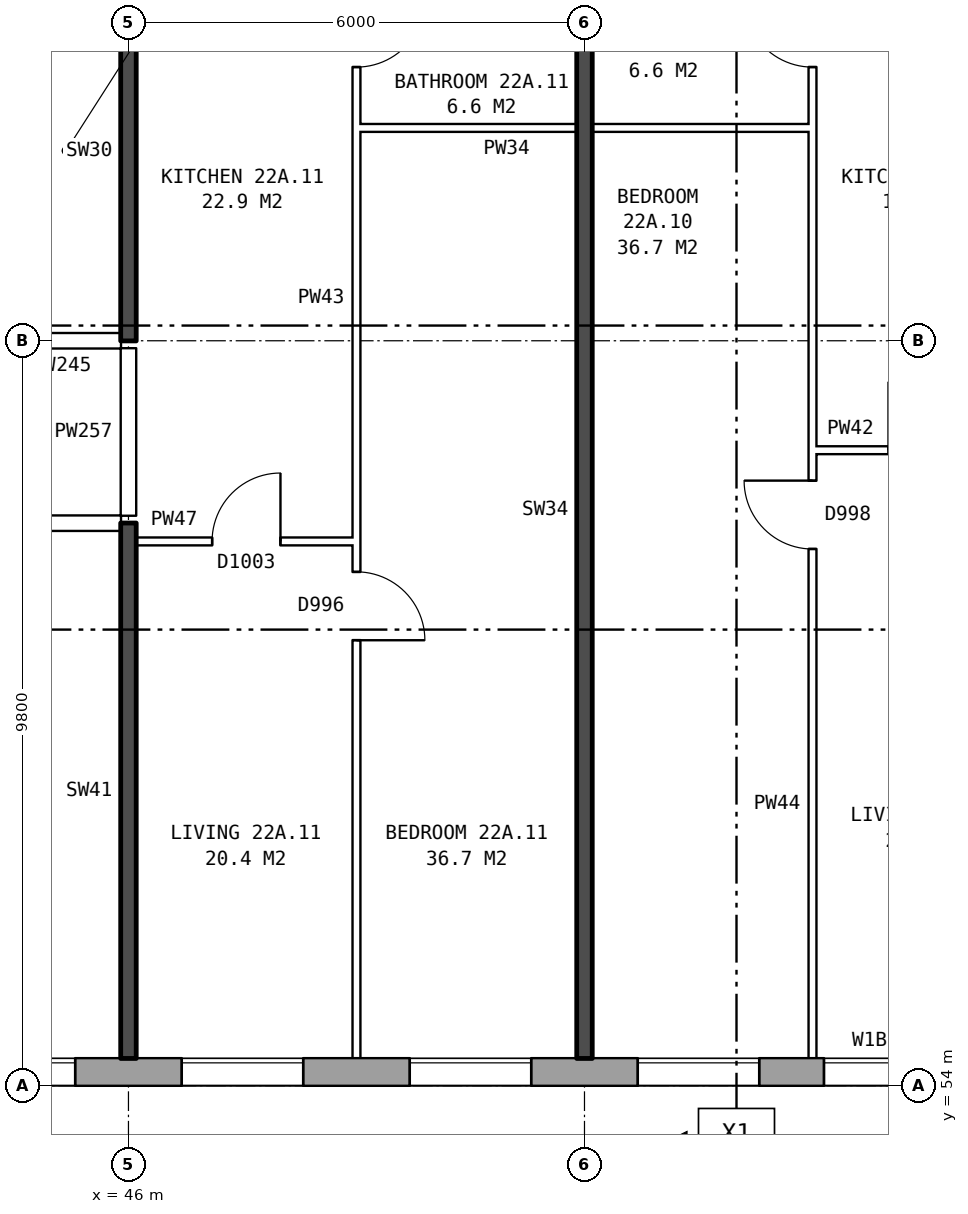
"""IFC4 building model, lengths in metres.
Left out: names, types, materials, properties, quantities, classifications, styles, units other than length and angle.
Written with IfcOpenShell. Run it as: python <this file> out.ifc"""

import sys

from ifc_helpers import new_model, si_unit, direction, frame, frame_2d, origin, place, context, subcontext, project, spatial, rectangle, extrude, element, fill, save


model = new_model("IFC4")
c1 = context("Model", 3, precision=1e-05, world=origin(), true_north=direction((0.0, 1.0)))
c2 = subcontext(c1, "Body", "Model", "MODEL_VIEW")
j1 = project(units=[si_unit("LENGTHUNIT", "METRE"), si_unit("PLANEANGLEUNIT", "RADIAN")], contexts=[c1])
p1 = place(None, origin())
s1 = spatial("IfcSite", under=j1, at=p1, CompositionType="ELEMENT")
p2 = place(p1, origin())
s2 = spatial("IfcBuilding", under=s1, at=p2, CompositionType="ELEMENT")
p3 = place(p2, frame((0.0, 0.0, 80.9)))
s3 = spatial("IfcBuildingStorey", under=s2, at=p3, CompositionType="ELEMENT", Elevation=80.9)
p4 = place(p3, frame((26.325, 54.18, 0.0), z_axis=(0.0, 0.0, 1.0), x_axis=(1.0, 0.0, 0.0)))
e1 = element("IfcWall", 1, at=p4, inside=s3, PredefinedType="STANDARD", context=c2, shape_type="SweptSolid", body=[
    extrude(rectangle(XDim=46.601, YDim=0.36, at=frame_2d((23.3, 0.0))), origin(), (0.0, 0.0, 1.0), 2.85),
])
p5 = place(p4, frame((2.375, 0.0, 0.8)))
e2 = element("IfcOpeningElement", 2, at=p5, cuts=e1, PredefinedType="OPENING", context=c2, shape_type="SweptSolid", body=[
    extrude(rectangle(XDim=1.6, YDim=1.8, at=frame_2d((0.8, 0.9))), frame((0.0, 0.19, 0.0), z_axis=(0.0, -1.0, 0.0), x_axis=(1.0, 0.0, 0.0)), (0.0, 0.0, 1.0), 0.38),
])
p6 = place(p4, frame((5.375, 0.0, 0.8)))
e3 = element("IfcOpeningElement", 3, at=p6, cuts=e1, PredefinedType="OPENING", context=c2, shape_type="SweptSolid", body=[
    extrude(rectangle(XDim=1.6, YDim=1.8, at=frame_2d((0.8, 0.9))), frame((0.0, 0.19, 0.0), z_axis=(0.0, -1.0, 0.0), x_axis=(1.0, 0.0, 0.0)), (0.0, 0.0, 1.0), 0.38),
])
p7 = place(p4, frame((8.375, 0.0, 0.8)))
e4 = element("IfcOpeningElement", 4, at=p7, cuts=e1, PredefinedType="OPENING", context=c2, shape_type="SweptSolid", body=[
    extrude(rectangle(XDim=1.6, YDim=1.8, at=frame_2d((0.8, 0.9))), frame((0.0, 0.19, 0.0), z_axis=(0.0, -1.0, 0.0), x_axis=(1.0, 0.0, 0.0)), (0.0, 0.0, 1.0), 0.38),
])
p8 = place(p4, frame((11.375, 0.0, 0.8)))
e5 = element("IfcOpeningElement", 5, at=p8, cuts=e1, PredefinedType="OPENING", context=c2, shape_type="SweptSolid", body=[
    extrude(rectangle(XDim=1.6, YDim=1.8, at=frame_2d((0.8, 0.9))), frame((0.0, 0.19, 0.0), z_axis=(0.0, -1.0, 0.0), x_axis=(1.0, 0.0, 0.0)), (0.0, 0.0, 1.0), 0.38),
])
p9 = place(p4, frame((15.875, 0.0, 0.8)))
e6 = element("IfcOpeningElement", 6, at=p9, cuts=e1, PredefinedType="OPENING", context=c2, shape_type="SweptSolid", body=[
    extrude(rectangle(XDim=1.2, YDim=1.2, at=frame_2d((0.6, 0.6))), frame((0.0, 0.19, 0.0), z_axis=(0.0, -1.0, 0.0), x_axis=(1.0, 0.0, 0.0)), (0.0, 0.0, 1.0), 0.38),
])
p10 = place(p4, frame((17.375, 0.0, 0.8)))
e7 = element("IfcOpeningElement", 7, at=p10, cuts=e1, PredefinedType="OPENING", context=c2, shape_type="SweptSolid", body=[
    extrude(rectangle(XDim=1.6, YDim=1.8, at=frame_2d((0.8, 0.9))), frame((0.0, 0.19, 0.0), z_axis=(0.0, -1.0, 0.0), x_axis=(1.0, 0.0, 0.0)), (0.0, 0.0, 1.0), 0.38),
])
p11 = place(p4, frame((20.375, 0.0, 0.8)))
e8 = element("IfcOpeningElement", 8, at=p11, cuts=e1, PredefinedType="OPENING", context=c2, shape_type="SweptSolid", body=[
    extrude(rectangle(XDim=1.6, YDim=1.8, at=frame_2d((0.8, 0.9))), frame((0.0, 0.19, 0.0), z_axis=(0.0, -1.0, 0.0), x_axis=(1.0, 0.0, 0.0)), (0.0, 0.0, 1.0), 0.38),
])
p12 = place(p4, frame((23.375, 0.0, 0.8)))
e9 = element("IfcOpeningElement", 9, at=p12, cuts=e1, PredefinedType="OPENING", context=c2, shape_type="SweptSolid", body=[
    extrude(rectangle(XDim=1.6, YDim=1.8, at=frame_2d((0.8, 0.9))), frame((0.0, 0.19, 0.0), z_axis=(0.0, -1.0, 0.0), x_axis=(1.0, 0.0, 0.0)), (0.0, 0.0, 1.0), 0.38),
])
p13 = place(p4, frame((26.375, 0.0, 0.8)))
e10 = element("IfcOpeningElement", 10, at=p13, cuts=e1, PredefinedType="OPENING", context=c2, shape_type="SweptSolid", body=[
    extrude(rectangle(XDim=1.6, YDim=1.8, at=frame_2d((0.8, 0.9))), frame((0.0, 0.19, 0.0), z_axis=(0.0, -1.0, 0.0), x_axis=(1.0, 0.0, 0.0)), (0.0, 0.0, 1.0), 0.38),
])
p14 = place(p4, frame((28.825, 0.0, 0.8)))
e11 = element("IfcOpeningElement", 11, at=p14, cuts=e1, PredefinedType="OPENING", context=c2, shape_type="SweptSolid", body=[
    extrude(rectangle(XDim=1.2, YDim=1.8, at=frame_2d((0.6, 0.9))), frame((0.0, 0.19, 0.0), z_axis=(0.0, -1.0, 0.0), x_axis=(1.0, 0.0, 0.0)), (0.0, 0.0, 1.0), 0.38),
])
p15 = place(p4, frame((32.375, 0.0, 1.7)))
e12 = element("IfcOpeningElement", 12, at=p15, cuts=e1, PredefinedType="OPENING", context=c2, shape_type="SweptSolid", body=[
    extrude(rectangle(XDim=0.8, YDim=0.9, at=frame_2d((0.4, 0.45))), frame((0.0, 0.19, 0.0), z_axis=(0.0, -1.0, 0.0), x_axis=(1.0, 0.0, 0.0)), (0.0, 0.0, 1.0), 0.38),
])
p16 = place(p4, frame((35.375, 0.0, 0.8)))
e13 = element("IfcOpeningElement", 13, at=p16, cuts=e1, PredefinedType="OPENING", context=c2, shape_type="SweptSolid", body=[
    extrude(rectangle(XDim=1.6, YDim=1.8, at=frame_2d((0.8, 0.9))), frame((0.0, 0.19, 0.0), z_axis=(0.0, -1.0, 0.0), x_axis=(1.0, 0.0, 0.0)), (0.0, 0.0, 1.0), 0.38),
])
p17 = place(p4, frame((38.375, 0.0, 0.8)))
e14 = element("IfcOpeningElement", 14, at=p17, cuts=e1, PredefinedType="OPENING", context=c2, shape_type="SweptSolid", body=[
    extrude(rectangle(XDim=1.6, YDim=1.8, at=frame_2d((0.8, 0.9))), frame((0.0, 0.19, 0.0), z_axis=(0.0, -1.0, 0.0), x_axis=(1.0, 0.0, 0.0)), (0.0, 0.0, 1.0), 0.38),
])
p18 = place(p4, frame((41.375, 0.0, 0.8)))
e15 = element("IfcOpeningElement", 15, at=p18, cuts=e1, PredefinedType="OPENING", context=c2, shape_type="SweptSolid", body=[
    extrude(rectangle(XDim=1.6, YDim=1.8, at=frame_2d((0.8, 0.9))), frame((0.0, 0.19, 0.0), z_axis=(0.0, -1.0, 0.0), x_axis=(1.0, 0.0, 0.0)), (0.0, 0.0, 1.0), 0.38),
])
p19 = place(p4, frame((44.375, 0.0, 0.8)))
e16 = element("IfcOpeningElement", 16, at=p19, cuts=e1, PredefinedType="OPENING", context=c2, shape_type="SweptSolid", body=[
    extrude(rectangle(XDim=1.6, YDim=1.8, at=frame_2d((0.8, 0.9))), frame((0.0, 0.19, 0.0), z_axis=(0.0, -1.0, 0.0), x_axis=(1.0, 0.0, 0.0)), (0.0, 0.0, 1.0), 0.38),
])
p20 = place(p4, frame((30.325, 0.0, 0.8)))
e17 = element("IfcOpeningElement", 17, at=p20, cuts=e1, PredefinedType="OPENING", context=c2, shape_type="SweptSolid", body=[
    extrude(rectangle(XDim=0.6, YDim=0.9, at=frame_2d((0.3, 0.45))), frame((0.0, 0.19, 0.0), z_axis=(0.0, -1.0, 0.0), x_axis=(1.0, 0.0, 0.0)), (0.0, 0.0, 1.0), 0.38),
])
p21 = place(p4, frame((33.475, 0.0, 0.8)))
e18 = element("IfcOpeningElement", 18, at=p21, cuts=e1, PredefinedType="OPENING", context=c2, shape_type="SweptSolid", body=[
    extrude(rectangle(XDim=1.0, YDim=1.8, at=frame_2d((0.5, 0.9))), frame((0.0, 0.19, 0.0), z_axis=(0.0, -1.0, 0.0), x_axis=(1.0, 0.0, 0.0)), (0.0, 0.0, 1.0), 0.38),
])
p22 = place(p3, frame((46.1, 61.16, 0.0), z_axis=(0.0, 0.0, 1.0), x_axis=(1.0, 0.0, 0.0)))
e19 = element("IfcWall", 19, at=p22, inside=s3, PredefinedType="PARTITIONING", context=c2, shape_type="SweptSolid", body=[
    extrude(rectangle(XDim=2.9, YDim=0.1, at=frame_2d((1.45, 0.0))), origin(), (0.0, 0.0, 1.0), 2.85),
])
p23 = place(p22, frame((1.0, 0.0, 0.0)))
e20 = element("IfcOpeningElement", 20, at=p23, cuts=e19, PredefinedType="OPENING", context=c2, shape_type="SweptSolid", body=[
    extrude(rectangle(XDim=0.9, YDim=2.1, at=frame_2d((0.45, 1.05))), frame((0.0, 0.06, 0.0), z_axis=(0.0, -1.0, 0.0), x_axis=(1.0, 0.0, 0.0)), (0.0, 0.0, 1.0), 0.12),
])
p24 = place(p3, frame((23.61, 61.4, 0.0), z_axis=(0.0, 0.0, 1.0), x_axis=(1.0, 0.0, 0.0)))
e21 = element("IfcWall", 21, at=p24, inside=s3, PredefinedType="PARTITIONING", context=c2, shape_type="SweptSolid", body=[
    extrude(rectangle(XDim=22.29, YDim=0.2, at=frame_2d((11.145, 0.0))), origin(), (0.0, 0.0, 1.0), 2.85),
])
p25 = place(p24, frame((18.84, 0.0, 0.0)))
e22 = element("IfcOpeningElement", 22, at=p25, cuts=e21, PredefinedType="OPENING", context=c2, shape_type="SweptSolid", body=[
    extrude(rectangle(XDim=1.0, YDim=2.1, at=frame_2d((0.5, 1.05))), frame((0.0, 0.11, 0.0), z_axis=(0.0, -1.0, 0.0), x_axis=(1.0, 0.0, 0.0)), (0.0, 0.0, 1.0), 0.22),
])
p26 = place(p24, frame((6.89, 0.0, 0.0)))
e23 = element("IfcOpeningElement", 23, at=p26, cuts=e21, PredefinedType="OPENING", context=c2, shape_type="SweptSolid", body=[
    extrude(rectangle(XDim=1.0, YDim=2.1, at=frame_2d((0.5, 1.05))), frame((0.0, 0.11, 0.0), z_axis=(0.0, -1.0, 0.0), x_axis=(1.0, 0.0, 0.0)), (0.0, 0.0, 1.0), 0.22),
])
p27 = place(p3, frame((55.0, 62.36, 0.0), z_axis=(0.0, 0.0, 1.0), x_axis=(1.0, 0.0, 0.0)))
e24 = element("IfcWall", 24, at=p27, inside=s3, PredefinedType="PARTITIONING", context=c2, shape_type="SweptSolid", body=[
    extrude(rectangle(XDim=2.9, YDim=0.1, at=frame_2d((1.45, 0.0))), origin(), (0.0, 0.0, 1.0), 2.85),
])
p28 = place(p27, frame((1.0, 0.0, 0.0)))
e25 = element("IfcOpeningElement", 25, at=p28, cuts=e24, PredefinedType="OPENING", context=c2, shape_type="SweptSolid", body=[
    extrude(rectangle(XDim=0.9, YDim=2.1, at=frame_2d((0.45, 1.05))), frame((0.0, 0.06, 0.0), z_axis=(0.0, -1.0, 0.0), x_axis=(1.0, 0.0, 0.0)), (0.0, 0.0, 1.0), 0.12),
])
p29 = place(p3, frame((44.36, 63.8, 0.0), z_axis=(0.0, 0.0, 1.0), x_axis=(1.0, 0.0, 0.0)))
e26 = element("IfcWall", 26, at=p29, inside=s3, PredefinedType="PARTITIONING", context=c2, shape_type="SweptSolid", body=[
    extrude(rectangle(XDim=1.54, YDim=0.2, at=frame_2d((0.77, 0.0))), origin(), (0.0, 0.0, 1.0), 2.85),
])
p30 = place(p3, frame((49.0, 66.6, 0.0), z_axis=(0.0, 0.0, 1.0), x_axis=(1.0, 0.0, 0.0)))
e27 = element("IfcWall", 27, at=p30, inside=s3, PredefinedType="PARTITIONING", context=c2, shape_type="SweptSolid", body=[
    extrude(rectangle(XDim=6.0, YDim=0.1, at=frame_2d((3.0, 0.0))), origin(), (0.0, 0.0, 1.0), 2.85),
])
p31 = place(p3, frame((46.0, 54.36, 0.0), z_axis=(0.0, 0.0, 1.0), x_axis=(0.0, 1.0, 0.0)))
e28 = element("IfcWall", 28, at=p31, inside=s3, PredefinedType="SOLIDWALL", context=c2, shape_type="SweptSolid", body=[
    extrude(rectangle(XDim=7.04, YDim=0.2, at=frame_2d((3.52, 0.0))), origin(), (0.0, 0.0, 1.0), 2.85),
])
p32 = place(p3, frame((46.0, 61.5, 0.0), z_axis=(0.0, 0.0, 1.0), x_axis=(0.0, 1.0, 0.0)))
e29 = element("IfcWall", 29, at=p32, inside=s3, PredefinedType="PARTITIONING", context=c2, shape_type="SweptSolid", body=[
    extrude(rectangle(XDim=2.2, YDim=0.2, at=frame_2d((1.1, 0.0))), origin(), (0.0, 0.0, 1.0), 2.85),
])
p33 = place(p3, frame((46.0, 63.8, 0.0), z_axis=(0.0, 0.0, 1.0), x_axis=(0.0, 1.0, 0.0)))
e30 = element("IfcWall", 30, at=p33, inside=s3, PredefinedType="SOLIDWALL", context=c2, shape_type="SweptSolid", body=[
    extrude(rectangle(XDim=5.0, YDim=0.2, at=frame_2d((2.5, 0.0))), origin(), (0.0, 0.0, 1.0), 2.85),
])
p34 = place(p3, frame((49.0, 54.36, 0.0), z_axis=(0.0, 0.0, 1.0), x_axis=(0.0, 1.0, 0.0)))
e31 = element("IfcWall", 31, at=p34, inside=s3, PredefinedType="PARTITIONING", context=c2, shape_type="SweptSolid", body=[
    extrude(rectangle(XDim=14.34, YDim=0.1, at=frame_2d((7.17, 0.0))), origin(), (0.0, 0.0, 1.0), 2.85),
])
p35 = place(p34, frame((5.5, 0.0, 0.0)))
e32 = element("IfcOpeningElement", 32, at=p35, cuts=e31, PredefinedType="OPENING", context=c2, shape_type="SweptSolid", body=[
    extrude(rectangle(XDim=0.9, YDim=2.1, at=frame_2d((0.45, 1.05))), frame((0.0, 0.06, 0.0), z_axis=(0.0, -1.0, 0.0), x_axis=(1.0, 0.0, 0.0)), (0.0, 0.0, 1.0), 0.12),
])
p36 = place(p34, frame((13.04, 0.0, 0.0)))
e33 = element("IfcOpeningElement", 33, at=p36, cuts=e31, PredefinedType="OPENING", context=c2, shape_type="SweptSolid", body=[
    extrude(rectangle(XDim=0.9, YDim=2.1, at=frame_2d((0.45, 1.05))), frame((0.0, 0.06, 0.0), z_axis=(0.0, -1.0, 0.0), x_axis=(1.0, 0.0, 0.0)), (0.0, 0.0, 1.0), 0.12),
])
p37 = place(p3, frame((52.0, 54.36, 0.0), z_axis=(0.0, 0.0, 1.0), x_axis=(0.0, 1.0, 0.0)))
e34 = element("IfcWall", 34, at=p37, inside=s3, PredefinedType="SOLIDWALL", context=c2, shape_type="SweptSolid", body=[
    extrude(rectangle(XDim=14.44, YDim=0.2, at=frame_2d((7.22, 0.0))), origin(), (0.0, 0.0, 1.0), 2.85),
])
p38 = place(p3, frame((55.0, 54.36, 0.0), z_axis=(0.0, 0.0, 1.0), x_axis=(0.0, 1.0, 0.0)))
e35 = element("IfcWall", 35, at=p38, inside=s3, PredefinedType="PARTITIONING", context=c2, shape_type="SweptSolid", body=[
    extrude(rectangle(XDim=14.34, YDim=0.1, at=frame_2d((7.17, 0.0))), origin(), (0.0, 0.0, 1.0), 2.85),
])
p39 = place(p38, frame((6.7, 0.0, 0.0)))
e36 = element("IfcOpeningElement", 36, at=p39, cuts=e35, PredefinedType="OPENING", context=c2, shape_type="SweptSolid", body=[
    extrude(rectangle(XDim=0.9, YDim=2.1, at=frame_2d((0.45, 1.05))), frame((0.0, 0.06, 0.0), z_axis=(0.0, -1.0, 0.0), x_axis=(1.0, 0.0, 0.0)), (0.0, 0.0, 1.0), 0.12),
])
p40 = place(p38, frame((13.04, 0.0, 0.0)))
e37 = element("IfcOpeningElement", 37, at=p40, cuts=e35, PredefinedType="OPENING", context=c2, shape_type="SweptSolid", body=[
    extrude(rectangle(XDim=0.9, YDim=2.1, at=frame_2d((0.45, 1.05))), frame((0.0, 0.06, 0.0), z_axis=(0.0, -1.0, 0.0), x_axis=(1.0, 0.0, 0.0)), (0.0, 0.0, 1.0), 0.12),
])
p41 = place(p10, origin())
e38 = element("IfcWindow", 38, at=p41, inside=s3, PartitioningType="SINGLE_PANEL", PredefinedType="WINDOW", context=c2, shape_type="SweptSolid", body=[
    extrude(rectangle(XDim=1.6, YDim=1.8, at=frame_2d((0.8, 0.9))), frame((0.0, 0.15, 0.0), z_axis=(0.0, -1.0, 0.0), x_axis=(1.0, 0.0, 0.0)), (0.0, 0.0, 1.0), 0.06),
])
fill(e7, e38)
p42 = place(p11, origin())
e39 = element("IfcWindow", 39, at=p42, inside=s3, PartitioningType="SINGLE_PANEL", PredefinedType="WINDOW", context=c2, shape_type="SweptSolid", body=[
    extrude(rectangle(XDim=1.6, YDim=1.8, at=frame_2d((0.8, 0.9))), frame((0.0, 0.15, 0.0), z_axis=(0.0, -1.0, 0.0), x_axis=(1.0, 0.0, 0.0)), (0.0, 0.0, 1.0), 0.06),
])
fill(e8, e39)
p43 = place(p12, origin())
e40 = element("IfcWindow", 40, at=p43, inside=s3, PartitioningType="SINGLE_PANEL", PredefinedType="WINDOW", context=c2, shape_type="SweptSolid", body=[
    extrude(rectangle(XDim=1.6, YDim=1.8, at=frame_2d((0.8, 0.9))), frame((0.0, 0.15, 0.0), z_axis=(0.0, -1.0, 0.0), x_axis=(1.0, 0.0, 0.0)), (0.0, 0.0, 1.0), 0.06),
])
fill(e9, e40)
p44 = place(p13, origin())
e41 = element("IfcWindow", 41, at=p44, inside=s3, PartitioningType="SINGLE_PANEL", PredefinedType="WINDOW", context=c2, shape_type="SweptSolid", body=[
    extrude(rectangle(XDim=1.6, YDim=1.8, at=frame_2d((0.8, 0.9))), frame((0.0, 0.15, 0.0), z_axis=(0.0, -1.0, 0.0), x_axis=(1.0, 0.0, 0.0)), (0.0, 0.0, 1.0), 0.06),
])
fill(e10, e41)
p45 = place(p14, origin())
e42 = element("IfcWindow", 42, at=p45, inside=s3, PartitioningType="SINGLE_PANEL", PredefinedType="WINDOW", context=c2, shape_type="SweptSolid", body=[
    extrude(rectangle(XDim=1.2, YDim=1.8, at=frame_2d((0.6, 0.9))), frame((0.0, 0.15, 0.0), z_axis=(0.0, -1.0, 0.0), x_axis=(1.0, 0.0, 0.0)), (0.0, 0.0, 1.0), 0.06),
])
fill(e11, e42)
p46 = place(p39, origin())
e43 = element("IfcDoor", 43, at=p46, inside=s3, OperationType="SINGLE_SWING_RIGHT", PredefinedType="DOOR", context=c2, shape_type="SweptSolid", body=[
    extrude(rectangle(XDim=0.9, YDim=2.1, at=frame_2d((0.45, 1.05))), frame((0.0, 0.025, 0.0), z_axis=(0.0, -1.0, 0.0), x_axis=(1.0, 0.0, 0.0)), (0.0, 0.0, 1.0), 0.05),
])
fill(e36, e43)
p47 = place(p40, origin())
e44 = element("IfcDoor", 44, at=p47, inside=s3, OperationType="SINGLE_SWING_RIGHT", PredefinedType="DOOR", context=c2, shape_type="SweptSolid", body=[
    extrude(rectangle(XDim=0.9, YDim=2.1, at=frame_2d((0.45, 1.05))), frame((0.0, 0.025, 0.0), z_axis=(0.0, -1.0, 0.0), x_axis=(1.0, 0.0, 0.0)), (0.0, 0.0, 1.0), 0.05),
])
fill(e37, e44)
p48 = place(p35, frame((0.9, 0.0, 0.0), z_axis=(0.0, 0.0, 1.0), x_axis=(-1.0, 0.0, 0.0)))
e45 = element("IfcDoor", 45, at=p48, inside=s3, OperationType="SINGLE_SWING_RIGHT", PredefinedType="DOOR", context=c2, shape_type="SweptSolid", body=[
    extrude(rectangle(XDim=0.9, YDim=2.1, at=frame_2d((0.45, 1.05))), frame((0.0, 0.025, 0.0), z_axis=(0.0, -1.0, 0.0), x_axis=(1.0, 0.0, 0.0)), (0.0, 0.0, 1.0), 0.05),
])
fill(e32, e45)
p49 = place(p23, origin())
e46 = element("IfcDoor", 46, at=p49, inside=s3, OperationType="SINGLE_SWING_RIGHT", PredefinedType="DOOR", context=c2, shape_type="SweptSolid", body=[
    extrude(rectangle(XDim=0.9, YDim=2.1, at=frame_2d((0.45, 1.05))), frame((0.0, 0.025, 0.0), z_axis=(0.0, -1.0, 0.0), x_axis=(1.0, 0.0, 0.0)), (0.0, 0.0, 1.0), 0.05),
])
fill(e20, e46)
p50 = place(p36, frame((0.9, 0.0, 0.0), z_axis=(0.0, 0.0, 1.0), x_axis=(-1.0, 0.0, 0.0)))
e47 = element("IfcDoor", 47, at=p50, inside=s3, OperationType="SINGLE_SWING_LEFT", PredefinedType="DOOR", context=c2, shape_type="SweptSolid", body=[
    extrude(rectangle(XDim=0.9, YDim=2.1, at=frame_2d((0.45, 1.05))), frame((0.0, 0.025, 0.0), z_axis=(0.0, -1.0, 0.0), x_axis=(1.0, 0.0, 0.0)), (0.0, 0.0, 1.0), 0.05),
])
fill(e33, e47)
save(model, sys.argv[1])
